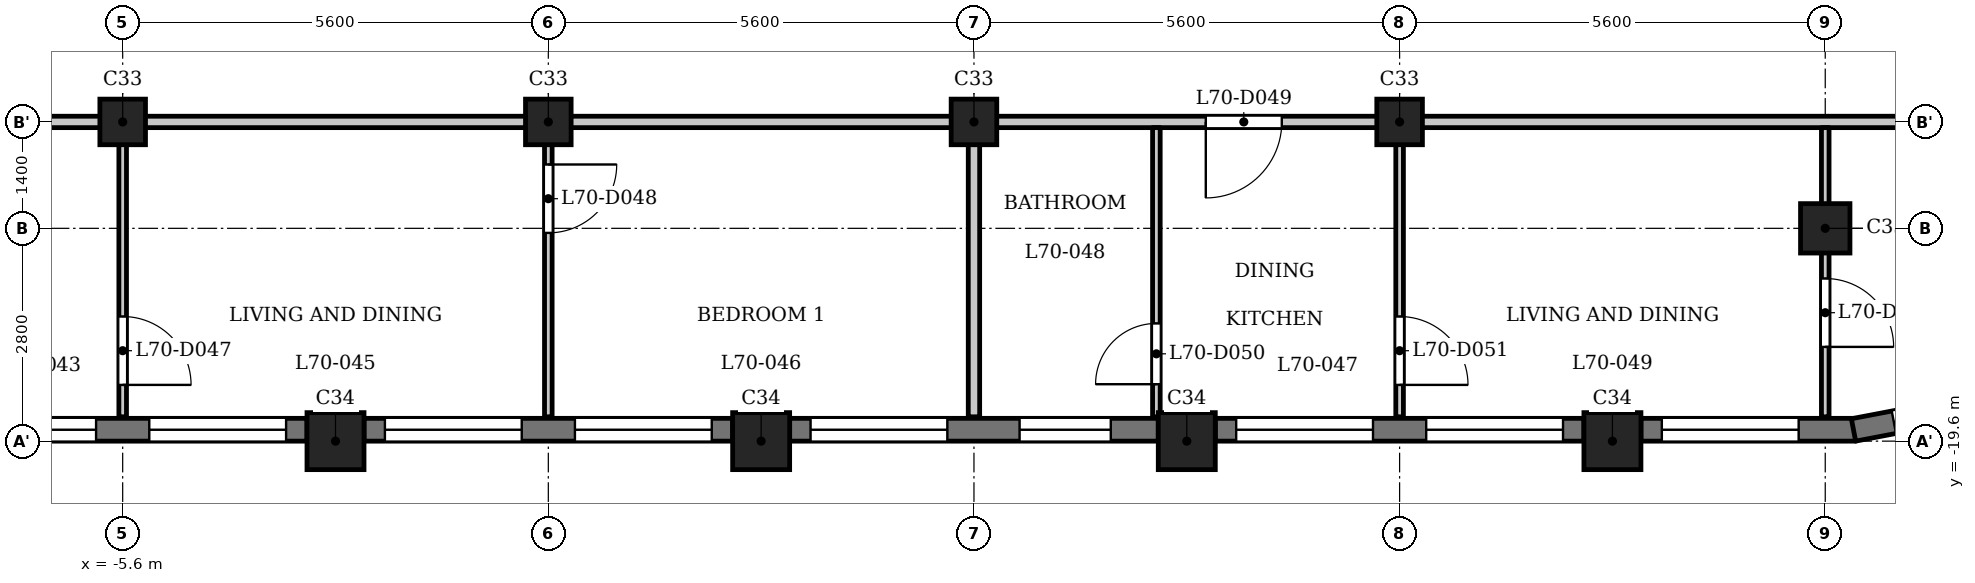
"""IFC4 building model, lengths in metres.
Left out: names, types, materials, properties, quantities, classifications, styles, units other than length and angle.
Written with IfcOpenShell. Run it as: python <this file> out.ifc"""

import sys

from ifc_helpers import new_model, si_unit, direction, frame, frame_2d, origin, origin_2d, place, context, subcontext, project, spatial, rectangle, extrude, element, fill, save


model = new_model("IFC4")
c1 = context("Model", 3, precision=1e-05, world=origin(), true_north=direction((0.0, 1.0)))
c2 = subcontext(c1, "Body", "Model", "MODEL_VIEW")
j1 = project(units=[si_unit("LENGTHUNIT", "METRE"), si_unit("PLANEANGLEUNIT", "RADIAN")], contexts=[c1])
p1 = place(None, origin())
s1 = spatial("IfcSite", under=j1, at=p1, CompositionType="ELEMENT")
p2 = place(p1, origin())
s2 = spatial("IfcBuilding", under=s1, at=p2, CompositionType="ELEMENT")
p3 = place(p2, frame((0.0, 0.0, 269.7)))
s3 = spatial("IfcBuildingStorey", under=s2, at=p3, CompositionType="ELEMENT", Elevation=269.7)
for number, where, z_axis, x_axis in (
    (1, (-2.8, -19.6, 0.0), (0.0, 0.0, 1.0), (1.0, 0.0, 0.0)),
    (2, (2.8, -19.6, 0.0), (0.0, 0.0, 1.0), (1.0, 0.0, 0.0)),
    (3, (8.4, -19.6, 0.0), (0.0, 0.0, 1.0), (1.0, 0.0, 0.0)),
    (4, (14.0, -19.6, 0.0), (0.0, 0.0, 1.0), (1.0, 0.0, 0.0)),
):
    element("IfcColumn", number, at=place(p3, frame(where, z_axis=z_axis, x_axis=x_axis)), inside=s3, PredefinedType="COLUMN", context=c2, shape_type="SweptSolid", body=[
        extrude(rectangle(XDim=0.75, YDim=0.75, at=origin_2d()), origin(), (0.0, 0.0, 1.0), 3.5),
    ])
p4 = place(p3, frame((16.8, -16.8, 0.0), z_axis=(0.0, 0.0, 1.0), x_axis=(1.0, 0.0, 0.0)))
e5 = element("IfcColumn", 5, at=p4, inside=s3, PredefinedType="COLUMN", context=c2, shape_type="SweptSolid", body=[
    extrude(rectangle(XDim=0.65, YDim=0.65, at=origin_2d()), origin(), (0.0, 0.0, 1.0), 3.5),
])
for number, where, z_axis, x_axis in (
    (6, (-5.6, -15.4, 0.0), (0.0, 0.0, 1.0), (1.0, 0.0, 0.0)),
    (7, (0.0, -15.4, 0.0), (0.0, 0.0, 1.0), (1.0, 0.0, 0.0)),
    (8, (5.6, -15.4, 0.0), (0.0, 0.0, 1.0), (1.0, 0.0, 0.0)),
    (9, (11.2, -15.4, 0.0), (0.0, 0.0, 1.0), (1.0, 0.0, 0.0)),
):
    element("IfcColumn", number, at=place(p3, frame(where, z_axis=z_axis, x_axis=x_axis)), inside=s3, PredefinedType="COLUMN", context=c2, shape_type="SweptSolid", body=[
        extrude(rectangle(XDim=0.6, YDim=0.6, at=origin_2d()), origin(), (0.0, 0.0, 1.0), 3.5),
    ])
p5 = place(p3, frame((-8.025, -19.45, 0.0), z_axis=(0.0, 0.0, 1.0), x_axis=(1.0, 0.0, 0.0)))
e10 = element("IfcWall", 10, at=p5, inside=s3, PredefinedType="SOLIDWALL", context=c2, shape_type="SweptSolid", body=[
    extrude(rectangle(XDim=4.85, YDim=0.3, at=frame_2d((2.425, 0.0))), origin(), (0.0, 0.0, 1.0), 2.55),
])
p6 = place(p5, frame((0.275, 0.0, 0.9)))
e11 = element("IfcOpeningElement", 11, at=p6, cuts=e10, PredefinedType="OPENING", context=c2, shape_type="SweptSolid", body=[
    extrude(rectangle(XDim=1.8, YDim=1.25, at=frame_2d((0.9, 0.625))), frame((0.0, 0.16, 0.0), z_axis=(0.0, -1.0, 0.0), x_axis=(1.0, 0.0, 0.0)), (0.0, 0.0, 1.0), 0.32),
])
p7 = place(p5, frame((2.775, 0.0, 0.9)))
e12 = element("IfcOpeningElement", 12, at=p7, cuts=e10, PredefinedType="OPENING", context=c2, shape_type="SweptSolid", body=[
    extrude(rectangle(XDim=1.8, YDim=1.25, at=frame_2d((0.9, 0.625))), frame((0.0, 0.16, 0.0), z_axis=(0.0, -1.0, 0.0), x_axis=(1.0, 0.0, 0.0)), (0.0, 0.0, 1.0), 0.32),
])
p8 = place(p3, frame((-2.425, -19.45, 0.0), z_axis=(0.0, 0.0, 1.0), x_axis=(1.0, 0.0, 0.0)))
e13 = element("IfcWall", 13, at=p8, inside=s3, PredefinedType="SOLIDWALL", context=c2, shape_type="SweptSolid", body=[
    extrude(rectangle(XDim=4.85, YDim=0.3, at=frame_2d((2.425, 0.0))), origin(), (0.0, 0.0, 1.0), 2.55),
])
p9 = place(p8, frame((0.275, 0.0, 0.9)))
e14 = element("IfcOpeningElement", 14, at=p9, cuts=e13, PredefinedType="OPENING", context=c2, shape_type="SweptSolid", body=[
    extrude(rectangle(XDim=1.8, YDim=1.25, at=frame_2d((0.9, 0.625))), frame((0.0, 0.16, 0.0), z_axis=(0.0, -1.0, 0.0), x_axis=(1.0, 0.0, 0.0)), (0.0, 0.0, 1.0), 0.32),
])
p10 = place(p8, frame((2.775, 0.0, 0.9)))
e15 = element("IfcOpeningElement", 15, at=p10, cuts=e13, PredefinedType="OPENING", context=c2, shape_type="SweptSolid", body=[
    extrude(rectangle(XDim=1.8, YDim=1.25, at=frame_2d((0.9, 0.625))), frame((0.0, 0.16, 0.0), z_axis=(0.0, -1.0, 0.0), x_axis=(1.0, 0.0, 0.0)), (0.0, 0.0, 1.0), 0.32),
])
p11 = place(p3, frame((3.175, -19.45, 0.0), z_axis=(0.0, 0.0, 1.0), x_axis=(1.0, 0.0, 0.0)))
e16 = element("IfcWall", 16, at=p11, inside=s3, PredefinedType="SOLIDWALL", context=c2, shape_type="SweptSolid", body=[
    extrude(rectangle(XDim=4.85, YDim=0.3, at=frame_2d((2.425, 0.0))), origin(), (0.0, 0.0, 1.0), 2.55),
])
p12 = place(p11, frame((0.275, 0.0, 0.9)))
e17 = element("IfcOpeningElement", 17, at=p12, cuts=e16, PredefinedType="OPENING", context=c2, shape_type="SweptSolid", body=[
    extrude(rectangle(XDim=1.8, YDim=1.25, at=frame_2d((0.9, 0.625))), frame((0.0, 0.16, 0.0), z_axis=(0.0, -1.0, 0.0), x_axis=(1.0, 0.0, 0.0)), (0.0, 0.0, 1.0), 0.32),
])
p13 = place(p11, frame((3.025, 0.0, 0.6)))
e18 = element("IfcOpeningElement", 18, at=p13, cuts=e16, PredefinedType="OPENING", context=c2, shape_type="SweptSolid", body=[
    extrude(rectangle(XDim=1.2, YDim=1.55, at=frame_2d((0.6, 0.775))), frame((0.0, 0.16, 0.0), z_axis=(0.0, -1.0, 0.0), x_axis=(1.0, 0.0, 0.0)), (0.0, 0.0, 1.0), 0.32),
])
p14 = place(p3, frame((8.775, -19.45, 0.0), z_axis=(0.0, 0.0, 1.0), x_axis=(1.0, 0.0, 0.0)))
e19 = element("IfcWall", 19, at=p14, inside=s3, PredefinedType="SOLIDWALL", context=c2, shape_type="SweptSolid", body=[
    extrude(rectangle(XDim=4.85, YDim=0.3, at=frame_2d((2.425, 0.0))), origin(), (0.0, 0.0, 1.0), 2.55),
])
p15 = place(p14, frame((0.275, 0.0, 0.9)))
e20 = element("IfcOpeningElement", 20, at=p15, cuts=e19, PredefinedType="OPENING", context=c2, shape_type="SweptSolid", body=[
    extrude(rectangle(XDim=1.8, YDim=1.25, at=frame_2d((0.9, 0.625))), frame((0.0, 0.16, 0.0), z_axis=(0.0, -1.0, 0.0), x_axis=(1.0, 0.0, 0.0)), (0.0, 0.0, 1.0), 0.32),
])
p16 = place(p14, frame((2.775, 0.0, 0.9)))
e21 = element("IfcOpeningElement", 21, at=p16, cuts=e19, PredefinedType="OPENING", context=c2, shape_type="SweptSolid", body=[
    extrude(rectangle(XDim=1.8, YDim=1.25, at=frame_2d((0.9, 0.625))), frame((0.0, 0.16, 0.0), z_axis=(0.0, -1.0, 0.0), x_axis=(1.0, 0.0, 0.0)), (0.0, 0.0, 1.0), 0.32),
])
p17 = place(p3, frame((14.375, -19.45, 0.0), z_axis=(0.0, 0.0, 1.0), x_axis=(1.0, 0.0, 0.0)))
e22 = element("IfcWall", 22, at=p17, inside=s3, PredefinedType="SOLIDWALL", context=c2, shape_type="SweptSolid", body=[
    extrude(rectangle(XDim=2.825, YDim=0.3, at=frame_2d((1.413, 0.0))), origin(), (0.0, 0.0, 1.0), 2.55),
])
p18 = place(p17, frame((0.275, 0.0, 0.9)))
e23 = element("IfcOpeningElement", 23, at=p18, cuts=e22, PredefinedType="OPENING", context=c2, shape_type="SweptSolid", body=[
    extrude(rectangle(XDim=1.8, YDim=1.25, at=frame_2d((0.9, 0.625))), frame((0.0, 0.16, 0.0), z_axis=(0.0, -1.0, 0.0), x_axis=(1.0, 0.0, 0.0)), (0.0, 0.0, 1.0), 0.32),
])
p19 = place(p3, frame((17.172, -19.453, 0.0), z_axis=(0.0, 0.0, 1.0), x_axis=(0.982284001233, 0.187398348234, 0.0)))
e24 = element("IfcWall", 24, at=p19, inside=s3, PredefinedType="SOLIDWALL", context=c2, shape_type="SweptSolid", body=[
    extrude(rectangle(XDim=1.881, YDim=0.3, at=frame_2d((0.941, 0.0))), origin(), (0.0, 0.0, 1.0), 2.55),
])
p20 = place(p19, frame((0.541, 0.0, 0.6)))
e25 = element("IfcOpeningElement", 25, at=p20, cuts=e24, PredefinedType="OPENING", context=c2, shape_type="SweptSolid", body=[
    extrude(rectangle(XDim=0.8, YDim=1.55, at=frame_2d((0.4, 0.775))), frame((0.0, 0.16, 0.0), z_axis=(0.0, -1.0, 0.0), x_axis=(1.0, 0.0, 0.0)), (0.0, 0.0, 1.0), 0.32),
])
p21 = place(p3, frame((-23.322, -15.4, 0.0), z_axis=(0.0, 0.0, 1.0), x_axis=(1.0, 0.0, 0.0)))
e26 = element("IfcWall", 26, at=p21, inside=s3, PredefinedType="PARTITIONING", context=c2, shape_type="SweptSolid", body=[
    extrude(rectangle(XDim=46.872, YDim=0.15, at=frame_2d((23.436, 0.0))), origin(), (0.0, 0.0, 1.0), 3.2),
])
p22 = place(p21, frame((8.172, 0.0, 0.0)))
e27 = element("IfcOpeningElement", 27, at=p22, cuts=e26, PredefinedType="OPENING", context=c2, shape_type="SweptSolid", body=[
    extrude(rectangle(XDim=1.0, YDim=2.1, at=frame_2d((0.5, 1.05))), frame((0.0, 0.085, 0.0), z_axis=(0.0, -1.0, 0.0), x_axis=(1.0, 0.0, 0.0)), (0.0, 0.0, 1.0), 0.17),
])
p23 = place(p21, frame((15.172, 0.0, 0.0)))
e28 = element("IfcOpeningElement", 28, at=p23, cuts=e26, PredefinedType="OPENING", context=c2, shape_type="SweptSolid", body=[
    extrude(rectangle(XDim=1.0, YDim=2.1, at=frame_2d((0.5, 1.05))), frame((0.0, 0.085, 0.0), z_axis=(0.0, -1.0, 0.0), x_axis=(1.0, 0.0, 0.0)), (0.0, 0.0, 1.0), 0.17),
])
p24 = place(p21, frame((31.972, 0.0, 0.0)))
e29 = element("IfcOpeningElement", 29, at=p24, cuts=e26, PredefinedType="OPENING", context=c2, shape_type="SweptSolid", body=[
    extrude(rectangle(XDim=1.0, YDim=2.1, at=frame_2d((0.5, 1.05))), frame((0.0, 0.085, 0.0), z_axis=(0.0, -1.0, 0.0), x_axis=(1.0, 0.0, 0.0)), (0.0, 0.0, 1.0), 0.17),
])
p25 = place(p3, frame((-5.6, -19.28, 0.0), z_axis=(0.0, 0.0, 1.0), x_axis=(0.0, 1.0, 0.0)))
e30 = element("IfcWall", 30, at=p25, inside=s3, PredefinedType="PARTITIONING", context=c2, shape_type="SweptSolid", body=[
    extrude(rectangle(XDim=3.805, YDim=0.1, at=frame_2d((1.902, 0.0))), origin(), (0.0, 0.0, 1.0), 3.2),
])
p26 = place(p25, frame((0.42, 0.0, 0.0)))
e31 = element("IfcOpeningElement", 31, at=p26, cuts=e30, PredefinedType="OPENING", context=c2, shape_type="SweptSolid", body=[
    extrude(rectangle(XDim=0.9, YDim=2.1, at=frame_2d((0.45, 1.05))), frame((0.0, 0.06, 0.0), z_axis=(0.0, -1.0, 0.0), x_axis=(1.0, 0.0, 0.0)), (0.0, 0.0, 1.0), 0.12),
])
p27 = place(p3, frame((0.0, -19.28, 0.0), z_axis=(0.0, 0.0, 1.0), x_axis=(0.0, 1.0, 0.0)))
e32 = element("IfcWall", 32, at=p27, inside=s3, PredefinedType="PARTITIONING", context=c2, shape_type="SweptSolid", body=[
    extrude(rectangle(XDim=3.805, YDim=0.1, at=frame_2d((1.902, 0.0))), origin(), (0.0, 0.0, 1.0), 3.2),
])
p28 = place(p27, frame((2.42, 0.0, 0.0)))
e33 = element("IfcOpeningElement", 33, at=p28, cuts=e32, PredefinedType="OPENING", context=c2, shape_type="SweptSolid", body=[
    extrude(rectangle(XDim=0.9, YDim=2.1, at=frame_2d((0.45, 1.05))), frame((0.0, 0.06, 0.0), z_axis=(0.0, -1.0, 0.0), x_axis=(1.0, 0.0, 0.0)), (0.0, 0.0, 1.0), 0.12),
])
p29 = place(p3, frame((5.6, -19.28, 0.0), z_axis=(0.0, 0.0, 1.0), x_axis=(0.0, 1.0, 0.0)))
e34 = element("IfcWall", 34, at=p29, inside=s3, PredefinedType="PARTITIONING", context=c2, shape_type="SweptSolid", body=[
    extrude(rectangle(XDim=3.805, YDim=0.15, at=frame_2d((1.902, 0.0))), origin(), (0.0, 0.0, 1.0), 3.2),
])
p30 = place(p3, frame((8.0, -19.28, 0.0), z_axis=(0.0, 0.0, 1.0), x_axis=(0.0, 1.0, 0.0)))
e35 = element("IfcWall", 35, at=p30, inside=s3, PredefinedType="PARTITIONING", context=c2, shape_type="SweptSolid", body=[
    extrude(rectangle(XDim=3.805, YDim=0.1, at=frame_2d((1.902, 0.0))), origin(), (0.0, 0.0, 1.0), 3.2),
])
p31 = place(p30, frame((0.429, 0.0, 0.0)))
e36 = element("IfcOpeningElement", 36, at=p31, cuts=e35, PredefinedType="OPENING", context=c2, shape_type="SweptSolid", body=[
    extrude(rectangle(XDim=0.8, YDim=2.1, at=frame_2d((0.4, 1.05))), frame((0.0, 0.06, 0.0), z_axis=(0.0, -1.0, 0.0), x_axis=(1.0, 0.0, 0.0)), (0.0, 0.0, 1.0), 0.12),
])
p32 = place(p3, frame((11.2, -19.28, 0.0), z_axis=(0.0, 0.0, 1.0), x_axis=(0.0, 1.0, 0.0)))
e37 = element("IfcWall", 37, at=p32, inside=s3, PredefinedType="PARTITIONING", context=c2, shape_type="SweptSolid", body=[
    extrude(rectangle(XDim=3.805, YDim=0.1, at=frame_2d((1.902, 0.0))), origin(), (0.0, 0.0, 1.0), 3.2),
])
p33 = place(p32, frame((0.42, 0.0, 0.0)))
e38 = element("IfcOpeningElement", 38, at=p33, cuts=e37, PredefinedType="OPENING", context=c2, shape_type="SweptSolid", body=[
    extrude(rectangle(XDim=0.9, YDim=2.1, at=frame_2d((0.45, 1.05))), frame((0.0, 0.06, 0.0), z_axis=(0.0, -1.0, 0.0), x_axis=(1.0, 0.0, 0.0)), (0.0, 0.0, 1.0), 0.12),
])
p34 = place(p3, frame((16.8, -19.28, 0.0), z_axis=(0.0, 0.0, 1.0), x_axis=(0.0, 1.0, 0.0)))
e39 = element("IfcWall", 39, at=p34, inside=s3, PredefinedType="PARTITIONING", context=c2, shape_type="SweptSolid", body=[
    extrude(rectangle(XDim=3.805, YDim=0.1, at=frame_2d((1.902, 0.0))), origin(), (0.0, 0.0, 1.0), 3.2),
])
p35 = place(p34, frame((0.92, 0.0, 0.0)))
e40 = element("IfcOpeningElement", 40, at=p35, cuts=e39, PredefinedType="OPENING", context=c2, shape_type="SweptSolid", body=[
    extrude(rectangle(XDim=0.9, YDim=2.1, at=frame_2d((0.45, 1.05))), frame((0.0, 0.06, 0.0), z_axis=(0.0, -1.0, 0.0), x_axis=(1.0, 0.0, 0.0)), (0.0, 0.0, 1.0), 0.12),
])
p36 = place(p26, origin())
e41 = element("IfcDoor", 41, at=p36, inside=s3, OperationType="SINGLE_SWING_LEFT", PredefinedType="DOOR", context=c2, shape_type="SweptSolid", body=[
    extrude(rectangle(XDim=0.9, YDim=2.1, at=frame_2d((0.45, 1.05))), frame((0.0, 0.025, 0.0), z_axis=(0.0, -1.0, 0.0), x_axis=(1.0, 0.0, 0.0)), (0.0, 0.0, 1.0), 0.05),
])
fill(e31, e41)
p37 = place(p28, origin())
e42 = element("IfcDoor", 42, at=p37, inside=s3, OperationType="SINGLE_SWING_RIGHT", PredefinedType="DOOR", context=c2, shape_type="SweptSolid", body=[
    extrude(rectangle(XDim=0.9, YDim=2.1, at=frame_2d((0.45, 1.05))), frame((0.0, 0.025, 0.0), z_axis=(0.0, -1.0, 0.0), x_axis=(1.0, 0.0, 0.0)), (0.0, 0.0, 1.0), 0.05),
])
fill(e33, e42)
p38 = place(p24, origin())
e43 = element("IfcDoor", 43, at=p38, inside=s3, OperationType="SINGLE_SWING_LEFT", PredefinedType="DOOR", context=c2, shape_type="SweptSolid", body=[
    extrude(rectangle(XDim=1.0, YDim=2.1, at=frame_2d((0.5, 1.05))), frame((0.0, 0.025, 0.0), z_axis=(0.0, -1.0, 0.0), x_axis=(1.0, 0.0, 0.0)), (0.0, 0.0, 1.0), 0.05),
])
fill(e29, e43)
p39 = place(p31, origin())
e44 = element("IfcDoor", 44, at=p39, inside=s3, OperationType="SINGLE_SWING_RIGHT", PredefinedType="DOOR", context=c2, shape_type="SweptSolid", body=[
    extrude(rectangle(XDim=0.8, YDim=2.1, at=frame_2d((0.4, 1.05))), frame((0.0, 0.025, 0.0), z_axis=(0.0, -1.0, 0.0), x_axis=(1.0, 0.0, 0.0)), (0.0, 0.0, 1.0), 0.05),
])
fill(e36, e44)
p40 = place(p33, origin())
e45 = element("IfcDoor", 45, at=p40, inside=s3, OperationType="SINGLE_SWING_LEFT", PredefinedType="DOOR", context=c2, shape_type="SweptSolid", body=[
    extrude(rectangle(XDim=0.9, YDim=2.1, at=frame_2d((0.45, 1.05))), frame((0.0, 0.025, 0.0), z_axis=(0.0, -1.0, 0.0), x_axis=(1.0, 0.0, 0.0)), (0.0, 0.0, 1.0), 0.05),
])
fill(e38, e45)
p41 = place(p35, origin())
e46 = element("IfcDoor", 46, at=p41, inside=s3, OperationType="SINGLE_SWING_LEFT", PredefinedType="DOOR", context=c2, shape_type="SweptSolid", body=[
    extrude(rectangle(XDim=0.9, YDim=2.1, at=frame_2d((0.45, 1.05))), frame((0.0, 0.025, 0.0), z_axis=(0.0, -1.0, 0.0), x_axis=(1.0, 0.0, 0.0)), (0.0, 0.0, 1.0), 0.05),
])
fill(e40, e46)
p42 = place(p6, origin())
e47 = element("IfcWindow", 47, at=p42, inside=s3, PartitioningType="SINGLE_PANEL", PredefinedType="WINDOW", context=c2, shape_type="SweptSolid", body=[
    extrude(rectangle(XDim=1.8, YDim=1.25, at=frame_2d((0.9, 0.625))), frame((0.0, 0.03, 0.0), z_axis=(0.0, -1.0, 0.0), x_axis=(1.0, 0.0, 0.0)), (0.0, 0.0, 1.0), 0.06),
])
fill(e11, e47)
p43 = place(p7, origin())
e48 = element("IfcWindow", 48, at=p43, inside=s3, PartitioningType="SINGLE_PANEL", PredefinedType="WINDOW", context=c2, shape_type="SweptSolid", body=[
    extrude(rectangle(XDim=1.8, YDim=1.25, at=frame_2d((0.9, 0.625))), frame((0.0, 0.03, 0.0), z_axis=(0.0, -1.0, 0.0), x_axis=(1.0, 0.0, 0.0)), (0.0, 0.0, 1.0), 0.06),
])
fill(e12, e48)
p44 = place(p9, origin())
e49 = element("IfcWindow", 49, at=p44, inside=s3, PartitioningType="SINGLE_PANEL", PredefinedType="WINDOW", context=c2, shape_type="SweptSolid", body=[
    extrude(rectangle(XDim=1.8, YDim=1.25, at=frame_2d((0.9, 0.625))), frame((0.0, 0.03, 0.0), z_axis=(0.0, -1.0, 0.0), x_axis=(1.0, 0.0, 0.0)), (0.0, 0.0, 1.0), 0.06),
])
fill(e14, e49)
p45 = place(p10, origin())
e50 = element("IfcWindow", 50, at=p45, inside=s3, PartitioningType="SINGLE_PANEL", PredefinedType="WINDOW", context=c2, shape_type="SweptSolid", body=[
    extrude(rectangle(XDim=1.8, YDim=1.25, at=frame_2d((0.9, 0.625))), frame((0.0, 0.03, 0.0), z_axis=(0.0, -1.0, 0.0), x_axis=(1.0, 0.0, 0.0)), (0.0, 0.0, 1.0), 0.06),
])
fill(e15, e50)
p46 = place(p12, origin())
e51 = element("IfcWindow", 51, at=p46, inside=s3, PartitioningType="SINGLE_PANEL", PredefinedType="WINDOW", context=c2, shape_type="SweptSolid", body=[
    extrude(rectangle(XDim=1.8, YDim=1.25, at=frame_2d((0.9, 0.625))), frame((0.0, 0.03, 0.0), z_axis=(0.0, -1.0, 0.0), x_axis=(1.0, 0.0, 0.0)), (0.0, 0.0, 1.0), 0.06),
])
fill(e17, e51)
p47 = place(p13, origin())
e52 = element("IfcWindow", 52, at=p47, inside=s3, PartitioningType="SINGLE_PANEL", PredefinedType="WINDOW", context=c2, shape_type="SweptSolid", body=[
    extrude(rectangle(XDim=1.2, YDim=1.55, at=frame_2d((0.6, 0.775))), frame((0.0, 0.03, 0.0), z_axis=(0.0, -1.0, 0.0), x_axis=(1.0, 0.0, 0.0)), (0.0, 0.0, 1.0), 0.06),
])
fill(e18, e52)
p48 = place(p15, origin())
e53 = element("IfcWindow", 53, at=p48, inside=s3, PartitioningType="SINGLE_PANEL", PredefinedType="WINDOW", context=c2, shape_type="SweptSolid", body=[
    extrude(rectangle(XDim=1.8, YDim=1.25, at=frame_2d((0.9, 0.625))), frame((0.0, 0.03, 0.0), z_axis=(0.0, -1.0, 0.0), x_axis=(1.0, 0.0, 0.0)), (0.0, 0.0, 1.0), 0.06),
])
fill(e20, e53)
p49 = place(p16, origin())
e54 = element("IfcWindow", 54, at=p49, inside=s3, PartitioningType="SINGLE_PANEL", PredefinedType="WINDOW", context=c2, shape_type="SweptSolid", body=[
    extrude(rectangle(XDim=1.8, YDim=1.25, at=frame_2d((0.9, 0.625))), frame((0.0, 0.03, 0.0), z_axis=(0.0, -1.0, 0.0), x_axis=(1.0, 0.0, 0.0)), (0.0, 0.0, 1.0), 0.06),
])
fill(e21, e54)
p50 = place(p18, origin())
e55 = element("IfcWindow", 55, at=p50, inside=s3, PartitioningType="SINGLE_PANEL", PredefinedType="WINDOW", context=c2, shape_type="SweptSolid", body=[
    extrude(rectangle(XDim=1.8, YDim=1.25, at=frame_2d((0.9, 0.625))), frame((0.0, 0.03, 0.0), z_axis=(0.0, -1.0, 0.0), x_axis=(1.0, 0.0, 0.0)), (0.0, 0.0, 1.0), 0.06),
])
fill(e23, e55)
p51 = place(p20, origin())
e56 = element("IfcWindow", 56, at=p51, inside=s3, PartitioningType="SINGLE_PANEL", PredefinedType="WINDOW", context=c2, shape_type="SweptSolid", body=[
    extrude(rectangle(XDim=0.8, YDim=1.55, at=frame_2d((0.4, 0.775))), frame((0.0, 0.03, 0.0), z_axis=(0.0, -1.0, 0.0), x_axis=(1.0, 0.0, 0.0)), (0.0, 0.0, 1.0), 0.06),
])
fill(e25, e56)
save(model, sys.argv[1])
